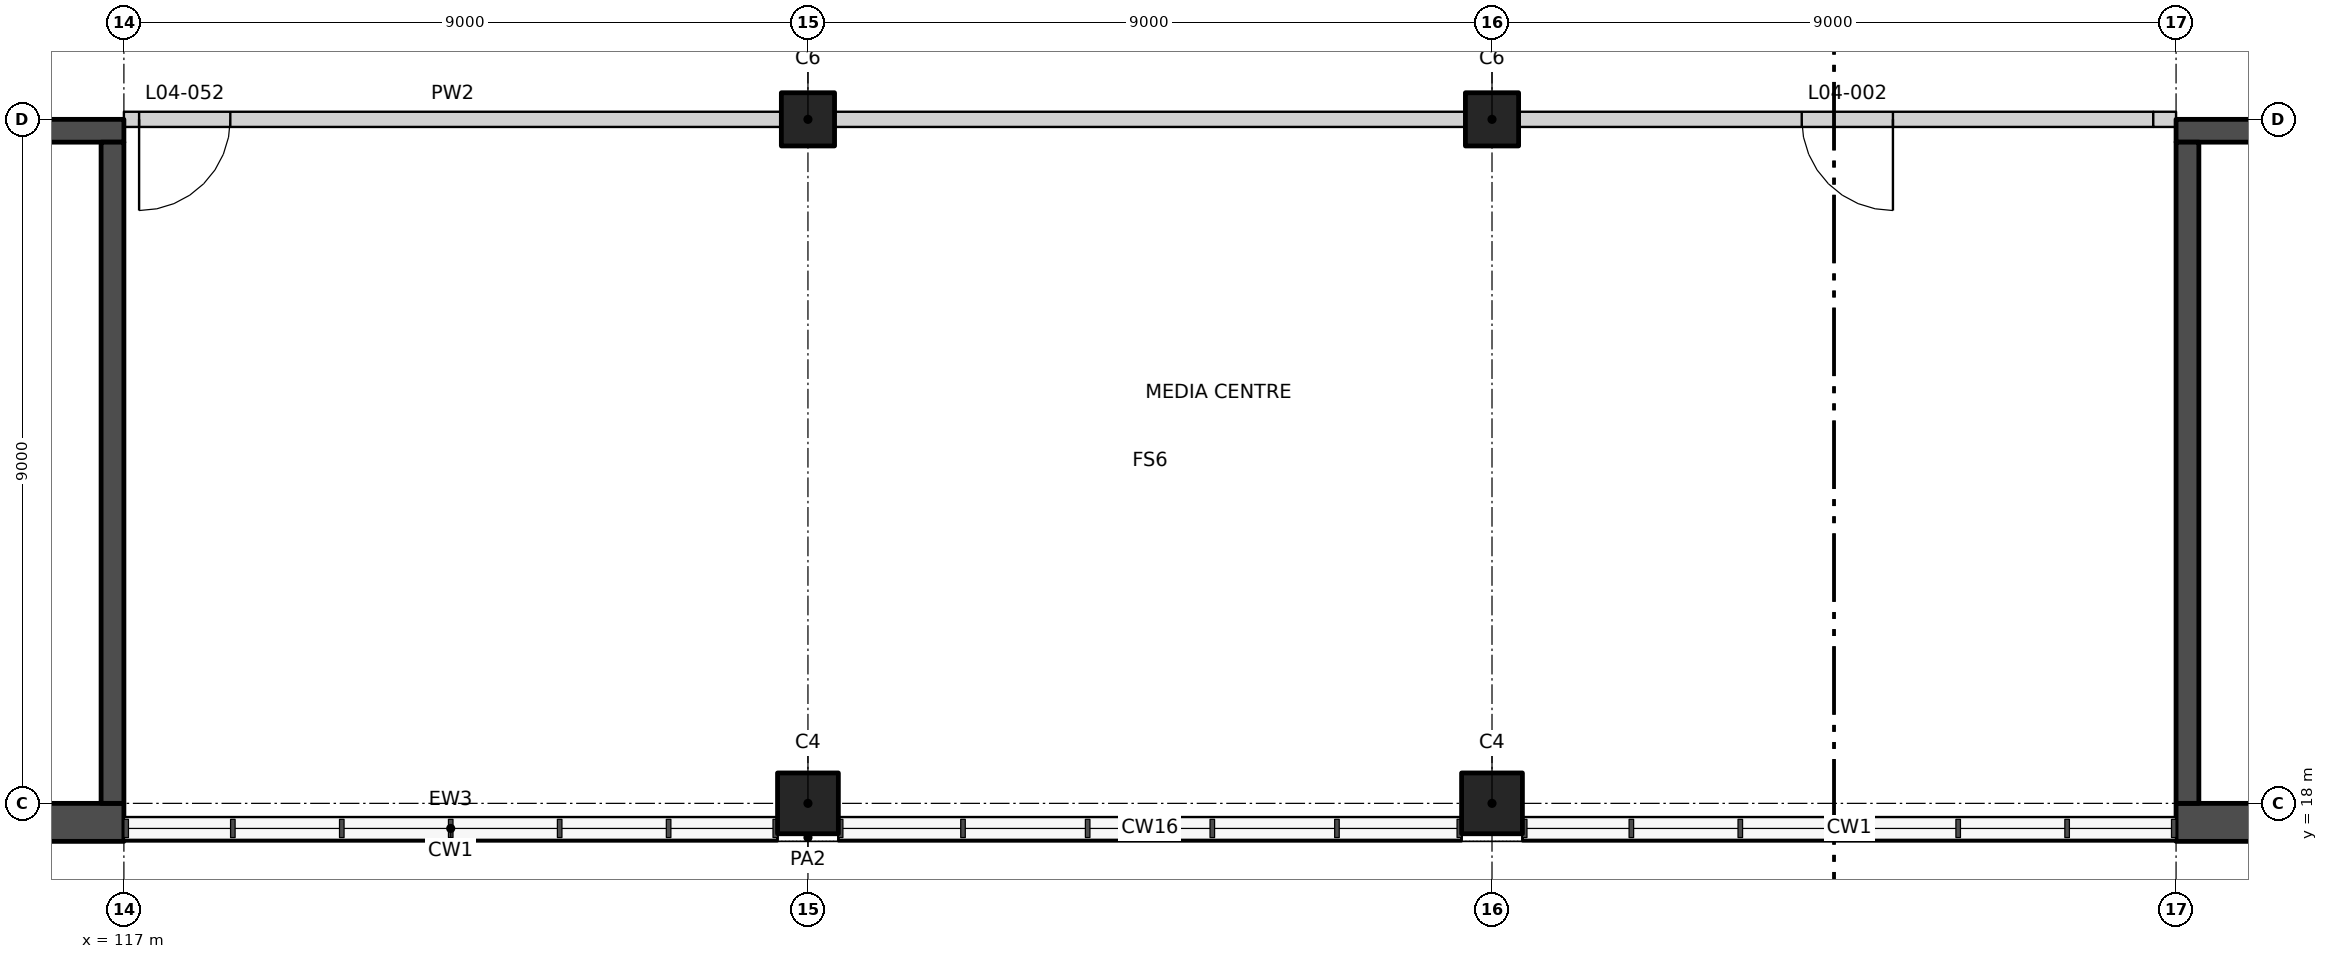
"""IFC4 building model, lengths in metres.
Left out: names, types, materials, properties, quantities, classifications, styles, units other than length and angle.
Written with IfcOpenShell. Run it as: python <this file> out.ifc"""

import sys

from ifc_helpers import new_model, si_unit, direction, frame, frame_2d, origin, origin_2d, place, context, subcontext, project, spatial, rectangle, extrude, element, fill, save


model = new_model("IFC4")
c1 = context("Model", 3, precision=1e-05, world=origin(), true_north=direction((0.0, 1.0)))
c2 = subcontext(c1, "Body", "Model", "MODEL_VIEW")
j1 = project(units=[si_unit("LENGTHUNIT", "METRE"), si_unit("PLANEANGLEUNIT", "RADIAN")], contexts=[c1])
p1 = place(None, origin())
s1 = spatial("IfcSite", under=j1, at=p1, CompositionType="ELEMENT")
p2 = place(p1, origin())
s2 = spatial("IfcBuilding", under=s1, at=p2, CompositionType="ELEMENT")
p3 = place(p2, frame((0.0, 0.0, 28.0)))
s3 = spatial("IfcBuildingStorey", under=s2, at=p3, CompositionType="ELEMENT", Elevation=28.0)
for number, where, z_axis, x_axis in (
    (1, (126.0, 18.0, 0.0), (0.0, 0.0, 1.0), (1.0, 0.0, 0.0)),
    (2, (135.0, 18.0, 0.0), (0.0, 0.0, 1.0), (1.0, 0.0, 0.0)),
):
    element("IfcColumn", number, at=place(p3, frame(where, z_axis=z_axis, x_axis=x_axis)), inside=s3, PredefinedType="COLUMN", context=c2, shape_type="SweptSolid", body=[
        extrude(rectangle(XDim=0.8, YDim=0.8, at=origin_2d()), origin(), (0.0, 0.0, 1.0), 5.5),
    ])
for number, where, z_axis, x_axis in (
    (3, (126.0, 27.0, 0.0), (0.0, 0.0, 1.0), (1.0, 0.0, 0.0)),
    (4, (135.0, 27.0, 0.0), (0.0, 0.0, 1.0), (1.0, 0.0, 0.0)),
):
    element("IfcColumn", number, at=place(p3, frame(where, z_axis=z_axis, x_axis=x_axis)), inside=s3, PredefinedType="COLUMN", context=c2, shape_type="SweptSolid", body=[
        extrude(rectangle(XDim=0.7, YDim=0.7, at=origin_2d()), origin(), (0.0, 0.0, 1.0), 5.5),
    ])
p4 = place(p3, frame((135.35, 27.0, 0.0), z_axis=(0.0, 0.0, 1.0), x_axis=(1.0, 0.0, 0.0)))
e5 = element("IfcWall", 5, at=p4, inside=s3, PredefinedType="PARTITIONING", context=c2, shape_type="SweptSolid", body=[
    extrude(rectangle(XDim=8.35, YDim=0.2, at=frame_2d((4.175, 0.0))), origin(), (0.0, 0.0, 1.0), 4.2),
])
p5 = place(p4, frame((3.725, 0.0, 0.0)))
e6 = element("IfcOpeningElement", 6, at=p5, cuts=e5, PredefinedType="OPENING", context=c2, shape_type="SweptSolid", body=[
    extrude(rectangle(XDim=1.2, YDim=2.1, at=frame_2d((0.6, 1.05))), frame((0.0, 0.11, 0.0), z_axis=(0.0, -1.0, 0.0), x_axis=(1.0, 0.0, 0.0)), (0.0, 0.0, 1.0), 0.22),
])
p6 = place(p3, frame((126.35, 27.0, 0.0), z_axis=(0.0, 0.0, 1.0), x_axis=(1.0, 0.0, 0.0)))
e7 = element("IfcWall", 7, at=p6, inside=s3, PredefinedType="PARTITIONING", context=c2, shape_type="SweptSolid", body=[
    extrude(rectangle(XDim=8.3, YDim=0.2, at=frame_2d((4.15, 0.0))), origin(), (0.0, 0.0, 1.0), 4.2),
])
p7 = place(p3, frame((117.0, 27.0, 0.0), z_axis=(0.0, 0.0, 1.0), x_axis=(1.0, 0.0, 0.0)))
e8 = element("IfcWall", 8, at=p7, inside=s3, PredefinedType="PARTITIONING", context=c2, shape_type="SweptSolid", body=[
    extrude(rectangle(XDim=8.65, YDim=0.2, at=frame_2d((4.325, 0.0))), origin(), (0.0, 0.0, 1.0), 4.2),
])
p8 = place(p7, frame((0.2, 0.0, 0.0)))
e9 = element("IfcOpeningElement", 9, at=p8, cuts=e8, PredefinedType="OPENING", context=c2, shape_type="SweptSolid", body=[
    extrude(rectangle(XDim=1.2, YDim=2.1, at=frame_2d((0.6, 1.05))), frame((0.0, 0.11, 0.0), z_axis=(0.0, -1.0, 0.0), x_axis=(1.0, 0.0, 0.0)), (0.0, 0.0, 1.0), 0.22),
])
p9 = place(p3, frame((117.0, 17.65, 0.0), z_axis=(0.0, 0.0, 1.0), x_axis=(1.0, 0.0, 0.0)))
e10 = element("IfcWall", 10, at=p9, inside=s3, PredefinedType="SOLIDWALL", context=c2, shape_type="SweptSolid", body=[
    extrude(rectangle(XDim=8.6, YDim=0.3, at=frame_2d((4.3, 0.0))), origin(), (0.0, 0.0, 1.0), 1.0),
])
p10 = place(p3, frame((126.4, 17.65, 0.0), z_axis=(0.0, 0.0, 1.0), x_axis=(1.0, 0.0, 0.0)))
e11 = element("IfcWall", 11, at=p10, inside=s3, PredefinedType="SOLIDWALL", context=c2, shape_type="SweptSolid", body=[
    extrude(rectangle(XDim=8.2, YDim=0.3, at=frame_2d((4.1, 0.0))), origin(), (0.0, 0.0, 1.0), 1.0),
])
p11 = place(p3, frame((135.4, 17.65, 0.0), z_axis=(0.0, 0.0, 1.0), x_axis=(1.0, 0.0, 0.0)))
e12 = element("IfcWall", 12, at=p11, inside=s3, PredefinedType="SOLIDWALL", context=c2, shape_type="SweptSolid", body=[
    extrude(rectangle(XDim=8.6, YDim=0.3, at=frame_2d((4.3, 0.0))), origin(), (0.0, 0.0, 1.0), 1.0),
])
p12 = place(p3, frame((117.0, 26.85, 0.0), z_axis=(0.0, 0.0, 1.0), x_axis=(-1.0, 0.0, 0.0)))
e13 = element("IfcWall", 13, at=p12, inside=s3, PredefinedType="SHEAR", context=c2, shape_type="SweptSolid", body=[
    extrude(rectangle(XDim=18.0, YDim=0.3, at=frame_2d((9.0, 0.0))), origin(), (0.0, 0.0, 1.0), 5.5),
])
p13 = place(p12, frame((1.5, 0.0, 0.0)))
e14 = element("IfcOpeningElement", 14, at=p13, cuts=e13, PredefinedType="OPENING", context=c2, shape_type="SweptSolid", body=[
    extrude(rectangle(XDim=1.2, YDim=2.1, at=frame_2d((0.6, 1.05))), frame((0.0, 0.16, 0.0), z_axis=(0.0, -1.0, 0.0), x_axis=(1.0, 0.0, 0.0)), (0.0, 0.0, 1.0), 0.32),
])
p14 = place(p3, frame((117.0, 17.75, 0.0), z_axis=(0.0, 0.0, 1.0), x_axis=(-1.0, 0.0, 0.0)))
e15 = element("IfcWall", 15, at=p14, inside=s3, PredefinedType="SHEAR", context=c2, shape_type="SweptSolid", body=[
    extrude(rectangle(XDim=18.0, YDim=0.5, at=frame_2d((9.0, 0.0))), origin(), (0.0, 0.0, 1.0), 5.5),
])
p15 = place(p3, frame((116.85, 26.7, 0.0), z_axis=(0.0, 0.0, 1.0), x_axis=(0.0, -1.0, 0.0)))
e16 = element("IfcWall", 16, at=p15, inside=s3, PredefinedType="SHEAR", context=c2, shape_type="SweptSolid", body=[
    extrude(rectangle(XDim=8.7, YDim=0.3, at=frame_2d((4.35, 0.0))), origin(), (0.0, 0.0, 1.0), 5.5),
])
p16 = place(p3, frame((144.0, 26.85, 0.0), z_axis=(0.0, 0.0, 1.0), x_axis=(1.0, 0.0, 0.0)))
e17 = element("IfcWall", 17, at=p16, inside=s3, PredefinedType="SHEAR", context=c2, shape_type="SweptSolid", body=[
    extrude(rectangle(XDim=18.0, YDim=0.3, at=frame_2d((9.0, 0.0))), origin(), (0.0, 0.0, 1.0), 5.5),
])
p17 = place(p16, frame((1.5, 0.0, 0.0)))
e18 = element("IfcOpeningElement", 18, at=p17, cuts=e17, PredefinedType="OPENING", context=c2, shape_type="SweptSolid", body=[
    extrude(rectangle(XDim=1.2, YDim=2.1, at=frame_2d((0.6, 1.05))), frame((0.0, 0.16, 0.0), z_axis=(0.0, -1.0, 0.0), x_axis=(1.0, 0.0, 0.0)), (0.0, 0.0, 1.0), 0.32),
])
p18 = place(p3, frame((144.0, 17.75, 0.0), z_axis=(0.0, 0.0, 1.0), x_axis=(1.0, 0.0, 0.0)))
e19 = element("IfcWall", 19, at=p18, inside=s3, PredefinedType="SHEAR", context=c2, shape_type="SweptSolid", body=[
    extrude(rectangle(XDim=18.0, YDim=0.5, at=frame_2d((9.0, 0.0))), origin(), (0.0, 0.0, 1.0), 5.5),
])
p19 = place(p3, frame((144.15, 26.7, 0.0), z_axis=(0.0, 0.0, 1.0), x_axis=(0.0, -1.0, 0.0)))
e20 = element("IfcWall", 20, at=p19, inside=s3, PredefinedType="SHEAR", context=c2, shape_type="SweptSolid", body=[
    extrude(rectangle(XDim=8.7, YDim=0.3, at=frame_2d((4.35, 0.0))), origin(), (0.0, 0.0, 1.0), 5.5),
])
p20 = place(p3, frame((143.7, 27.0, 0.0), z_axis=(0.0, 0.0, 1.0), x_axis=(1.0, 0.0, 0.0)))
e21 = element("IfcWall", 21, at=p20, inside=s3, PredefinedType="PARTITIONING", context=c2, shape_type="SweptSolid", body=[
    extrude(rectangle(XDim=0.3, YDim=0.2, at=frame_2d((0.15, 0.0))), origin(), (0.0, 0.0, 1.0), 5.5),
])
p21 = place(p5, frame((1.2, 0.0, 0.0), z_axis=(0.0, 0.0, 1.0), x_axis=(-1.0, 0.0, 0.0)))
e22 = element("IfcDoor", 22, at=p21, inside=s3, OperationType="SINGLE_SWING_LEFT", PredefinedType="DOOR", context=c2, shape_type="SweptSolid", body=[
    extrude(rectangle(XDim=1.2, YDim=2.1, at=frame_2d((0.6, 1.05))), frame((0.0, 0.025, 0.0), z_axis=(0.0, -1.0, 0.0), x_axis=(1.0, 0.0, 0.0)), (0.0, 0.0, 1.0), 0.05),
])
fill(e6, e22)
p22 = place(p8, frame((1.2, 0.0, 0.0), z_axis=(0.0, 0.0, 1.0), x_axis=(-1.0, 0.0, 0.0)))
e23 = element("IfcDoor", 23, at=p22, inside=s3, OperationType="SINGLE_SWING_RIGHT", PredefinedType="DOOR", context=c2, shape_type="SweptSolid", body=[
    extrude(rectangle(XDim=1.2, YDim=2.1, at=frame_2d((0.6, 1.05))), frame((0.0, 0.025, 0.0), z_axis=(0.0, -1.0, 0.0), x_axis=(1.0, 0.0, 0.0)), (0.0, 0.0, 1.0), 0.05),
])
fill(e9, e23)
save(model, sys.argv[1])
